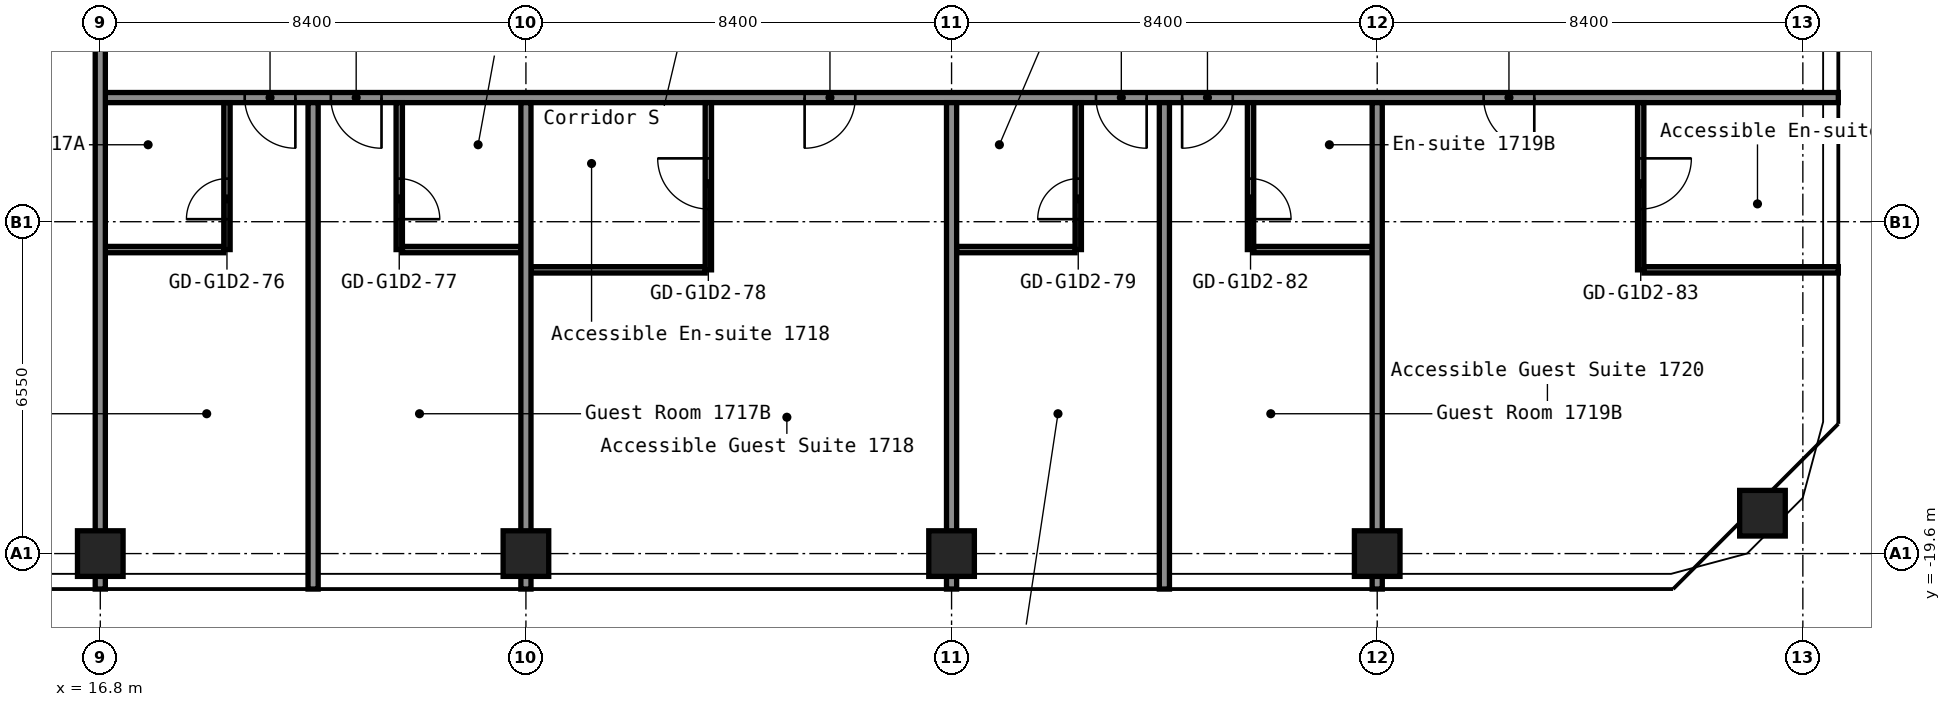
"""IFC4 building model, lengths in metres.
Left out: names, types, materials, properties, quantities, classifications, styles, units other than length and angle.
Written with IfcOpenShell. Run it as: python <this file> out.ifc"""

import sys

from ifc_helpers import new_model, si_unit, direction, frame, frame_2d, origin, origin_2d, place, context, subcontext, project, spatial, rectangle, hollow_rectangle, extrude, element, fill, save


model = new_model("IFC4")
c1 = context("Model", 3, precision=1e-05, world=origin(), true_north=direction((0.0, 1.0)))
c2 = subcontext(c1, "Body", "Model", "MODEL_VIEW")
j1 = project(units=[si_unit("LENGTHUNIT", "METRE"), si_unit("PLANEANGLEUNIT", "RADIAN")], contexts=[c1])
p1 = place(None, origin())
s1 = spatial("IfcSite", under=j1, at=p1, CompositionType="ELEMENT")
p2 = place(p1, origin())
s2 = spatial("IfcBuilding", under=s1, at=p2, CompositionType="ELEMENT")
p3 = place(p2, frame((0.0, 0.0, 61.4)))
s3 = spatial("IfcBuildingStorey", under=s2, at=p3, CompositionType="ELEMENT", Elevation=61.4)
for number, where, z_axis, x_axis in (
    (1, (16.8, -19.6, 0.0), (0.0, 0.0, 1.0), (1.0, 0.0, 0.0)),
    (2, (25.2, -19.6, 0.0), (0.0, 0.0, 1.0), (1.0, 0.0, 0.0)),
    (3, (33.6, -19.6, 0.0), (0.0, 0.0, 1.0), (1.0, 0.0, 0.0)),
    (4, (42.0, -19.6, 0.0), (0.0, 0.0, 1.0), (1.0, 0.0, 0.0)),
    (5, (49.603, -18.803, 0.0), (0.0, 0.0, 1.0), (1.0, 0.0, 0.0)),
):
    element("IfcColumn", number, at=place(p3, frame(where, z_axis=z_axis, x_axis=x_axis)), inside=s3, PredefinedType="COLUMN", context=c2, shape_type="SweptSolid", body=[
        extrude(hollow_rectangle(XDim=0.9, YDim=0.9, WallThickness=0.036, at=origin_2d()), origin(), (0.0, 0.0, 1.0), 2.9),
    ])
p4 = place(p3, frame((25.3, -14.0, 0.0), z_axis=(0.0, 0.0, 1.0), x_axis=(1.0, 0.0, 0.0)))
e6 = element("IfcWall", 6, at=p4, inside=s3, PredefinedType="PARTITIONING", context=c2, shape_type="SweptSolid", body=[
    extrude(rectangle(XDim=3.438, YDim=0.125, at=frame_2d((1.719, 0.0))), origin(), (0.0, 0.0, 1.0), 2.9),
])
p5 = place(p3, frame((47.262, -14.0, 0.0), z_axis=(0.0, 0.0, 1.0), x_axis=(1.0, 0.0, 0.0)))
e7 = element("IfcWall", 7, at=p5, inside=s3, PredefinedType="PARTITIONING", context=c2, shape_type="SweptSolid", body=[
    extrude(rectangle(XDim=3.838, YDim=0.125, at=frame_2d((1.919, 0.0))), origin(), (0.0, 0.0, 1.0), 2.9),
])
for number, where, z_axis, x_axis in (
    (8, (16.9, -13.6, 0.0), (0.0, 0.0, 1.0), (1.0, 0.0, 0.0)),
    (9, (22.762, -13.6, 0.0), (0.0, 0.0, 1.0), (1.0, 0.0, 0.0)),
    (10, (33.7, -13.6, 0.0), (0.0, 0.0, 1.0), (1.0, 0.0, 0.0)),
):
    element("IfcWall", number, at=place(p3, frame(where, z_axis=z_axis, x_axis=x_axis)), inside=s3, PredefinedType="PARTITIONING", context=c2, shape_type="SweptSolid", body=[
        extrude(rectangle(XDim=2.338, YDim=0.125, at=frame_2d((1.169, 0.0))), origin(), (0.0, 0.0, 1.0), 2.9),
    ])
p6 = place(p3, frame((39.562, -13.6, 0.0), z_axis=(0.0, 0.0, 1.0), x_axis=(1.0, 0.0, 0.0)))
e11 = element("IfcWall", 11, at=p6, inside=s3, PredefinedType="PARTITIONING", context=c2, shape_type="SweptSolid", body=[
    extrude(rectangle(XDim=2.337, YDim=0.125, at=frame_2d((1.169, 0.0))), origin(), (0.0, 0.0, 1.0), 2.9),
])
p7 = place(p3, frame((16.8, -10.6, 0.0), z_axis=(0.0, 0.0, 1.0), x_axis=(1.0, 0.0, 0.0)))
e12 = element("IfcWall", 12, at=p7, inside=s3, PredefinedType="PARTITIONING", context=c2, shape_type="SweptSolid", body=[
    extrude(rectangle(XDim=34.3, YDim=0.2, at=frame_2d((17.15, 0.0))), origin(), (0.0, 0.0, 1.0), 2.9),
])
p8 = place(p7, frame((2.85, 0.0, 0.0)))
e13 = element("IfcOpeningElement", 13, at=p8, cuts=e12, PredefinedType="OPENING", context=c2, shape_type="SweptSolid", body=[
    extrude(rectangle(XDim=1.0, YDim=2.1, at=frame_2d((0.5, 1.05))), frame((0.0, 0.11, 0.0), z_axis=(0.0, -1.0, 0.0), x_axis=(1.0, 0.0, 0.0)), (0.0, 0.0, 1.0), 0.22),
])
p9 = place(p7, frame((4.55, 0.0, 0.0)))
e14 = element("IfcOpeningElement", 14, at=p9, cuts=e12, PredefinedType="OPENING", context=c2, shape_type="SweptSolid", body=[
    extrude(rectangle(XDim=1.0, YDim=2.1, at=frame_2d((0.5, 1.05))), frame((0.0, 0.11, 0.0), z_axis=(0.0, -1.0, 0.0), x_axis=(1.0, 0.0, 0.0)), (0.0, 0.0, 1.0), 0.22),
])
p10 = place(p7, frame((13.9, 0.0, 0.0)))
e15 = element("IfcOpeningElement", 15, at=p10, cuts=e12, PredefinedType="OPENING", context=c2, shape_type="SweptSolid", body=[
    extrude(rectangle(XDim=1.0, YDim=2.1, at=frame_2d((0.5, 1.05))), frame((0.0, 0.11, 0.0), z_axis=(0.0, -1.0, 0.0), x_axis=(1.0, 0.0, 0.0)), (0.0, 0.0, 1.0), 0.22),
])
p11 = place(p7, frame((19.65, 0.0, 0.0)))
e16 = element("IfcOpeningElement", 16, at=p11, cuts=e12, PredefinedType="OPENING", context=c2, shape_type="SweptSolid", body=[
    extrude(rectangle(XDim=1.0, YDim=2.1, at=frame_2d((0.5, 1.05))), frame((0.0, 0.11, 0.0), z_axis=(0.0, -1.0, 0.0), x_axis=(1.0, 0.0, 0.0)), (0.0, 0.0, 1.0), 0.22),
])
p12 = place(p7, frame((21.35, 0.0, 0.0)))
e17 = element("IfcOpeningElement", 17, at=p12, cuts=e12, PredefinedType="OPENING", context=c2, shape_type="SweptSolid", body=[
    extrude(rectangle(XDim=1.0, YDim=2.1, at=frame_2d((0.5, 1.05))), frame((0.0, 0.11, 0.0), z_axis=(0.0, -1.0, 0.0), x_axis=(1.0, 0.0, 0.0)), (0.0, 0.0, 1.0), 0.22),
])
p13 = place(p7, frame((27.3, 0.0, 0.0)))
e18 = element("IfcOpeningElement", 18, at=p13, cuts=e12, PredefinedType="OPENING", context=c2, shape_type="SweptSolid", body=[
    extrude(rectangle(XDim=1.0, YDim=2.1, at=frame_2d((0.5, 1.05))), frame((0.0, 0.11, 0.0), z_axis=(0.0, -1.0, 0.0), x_axis=(1.0, 0.0, 0.0)), (0.0, 0.0, 1.0), 0.22),
])
p14 = place(p3, frame((16.8, -20.3, 0.0), z_axis=(0.0, 0.0, 1.0), x_axis=(0.0, 1.0, 0.0)))
e19 = element("IfcWall", 19, at=p14, inside=s3, PredefinedType="PARTITIONING", context=c2, shape_type="SweptSolid", body=[
    extrude(rectangle(XDim=11.91, YDim=0.2, at=frame_2d((5.955, 0.0))), origin(), (0.0, 0.0, 1.0), 2.9),
])
p15 = place(p3, frame((19.3, -13.6, 0.0), z_axis=(0.0, 0.0, 1.0), x_axis=(0.0, 1.0, 0.0)))
e20 = element("IfcWall", 20, at=p15, inside=s3, PredefinedType="PARTITIONING", context=c2, shape_type="SweptSolid", body=[
    extrude(rectangle(XDim=2.9, YDim=0.125, at=frame_2d((1.45, 0.0))), origin(), (0.0, 0.0, 1.0), 2.9),
])
p16 = place(p15, frame((0.6, 0.0, 0.0)))
e21 = element("IfcOpeningElement", 21, at=p16, cuts=e20, PredefinedType="OPENING", context=c2, shape_type="SweptSolid", body=[
    extrude(rectangle(XDim=0.8, YDim=2.1, at=frame_2d((0.4, 1.05))), frame((0.0, 0.073, 0.0), z_axis=(0.0, -1.0, 0.0), x_axis=(1.0, 0.0, 0.0)), (0.0, 0.0, 1.0), 0.145),
])
p17 = place(p3, frame((21.0, -20.3, 0.0), z_axis=(0.0, 0.0, 1.0), x_axis=(0.0, 1.0, 0.0)))
e22 = element("IfcWall", 22, at=p17, inside=s3, PredefinedType="PARTITIONING", context=c2, shape_type="SweptSolid", body=[
    extrude(rectangle(XDim=9.6, YDim=0.2, at=frame_2d((4.8, 0.0))), origin(), (0.0, 0.0, 1.0), 2.9),
])
p18 = place(p3, frame((22.7, -13.6, 0.0), z_axis=(0.0, 0.0, 1.0), x_axis=(0.0, 1.0, 0.0)))
e23 = element("IfcWall", 23, at=p18, inside=s3, PredefinedType="PARTITIONING", context=c2, shape_type="SweptSolid", body=[
    extrude(rectangle(XDim=2.9, YDim=0.125, at=frame_2d((1.45, 0.0))), origin(), (0.0, 0.0, 1.0), 2.9),
])
p19 = place(p18, frame((0.6, 0.0, 0.0)))
e24 = element("IfcOpeningElement", 24, at=p19, cuts=e23, PredefinedType="OPENING", context=c2, shape_type="SweptSolid", body=[
    extrude(rectangle(XDim=0.8, YDim=2.1, at=frame_2d((0.4, 1.05))), frame((0.0, 0.073, 0.0), z_axis=(0.0, -1.0, 0.0), x_axis=(1.0, 0.0, 0.0)), (0.0, 0.0, 1.0), 0.145),
])
p20 = place(p3, frame((25.2, -20.3, 0.0), z_axis=(0.0, 0.0, 1.0), x_axis=(0.0, 1.0, 0.0)))
e25 = element("IfcWall", 25, at=p20, inside=s3, PredefinedType="PARTITIONING", context=c2, shape_type="SweptSolid", body=[
    extrude(rectangle(XDim=9.6, YDim=0.2, at=frame_2d((4.8, 0.0))), origin(), (0.0, 0.0, 1.0), 2.9),
])
p21 = place(p3, frame((28.8, -14.0, 0.0), z_axis=(0.0, 0.0, 1.0), x_axis=(0.0, 1.0, 0.0)))
e26 = element("IfcWall", 26, at=p21, inside=s3, PredefinedType="PARTITIONING", context=c2, shape_type="SweptSolid", body=[
    extrude(rectangle(XDim=3.3, YDim=0.125, at=frame_2d((1.65, 0.0))), origin(), (0.0, 0.0, 1.0), 2.9),
])
p22 = place(p21, frame((1.2, 0.0, 0.0)))
e27 = element("IfcOpeningElement", 27, at=p22, cuts=e26, PredefinedType="OPENING", context=c2, shape_type="SweptSolid", body=[
    extrude(rectangle(XDim=1.0, YDim=2.1, at=frame_2d((0.5, 1.05))), frame((0.0, 0.073, 0.0), z_axis=(0.0, -1.0, 0.0), x_axis=(1.0, 0.0, 0.0)), (0.0, 0.0, 1.0), 0.145),
])
p23 = place(p3, frame((33.6, -20.3, 0.0), z_axis=(0.0, 0.0, 1.0), x_axis=(0.0, 1.0, 0.0)))
e28 = element("IfcWall", 28, at=p23, inside=s3, PredefinedType="PARTITIONING", context=c2, shape_type="SweptSolid", body=[
    extrude(rectangle(XDim=9.6, YDim=0.2, at=frame_2d((4.8, 0.0))), origin(), (0.0, 0.0, 1.0), 2.9),
])
p24 = place(p3, frame((36.1, -13.6, 0.0), z_axis=(0.0, 0.0, 1.0), x_axis=(0.0, 1.0, 0.0)))
e29 = element("IfcWall", 29, at=p24, inside=s3, PredefinedType="PARTITIONING", context=c2, shape_type="SweptSolid", body=[
    extrude(rectangle(XDim=2.9, YDim=0.125, at=frame_2d((1.45, 0.0))), origin(), (0.0, 0.0, 1.0), 2.9),
])
p25 = place(p24, frame((0.6, 0.0, 0.0)))
e30 = element("IfcOpeningElement", 30, at=p25, cuts=e29, PredefinedType="OPENING", context=c2, shape_type="SweptSolid", body=[
    extrude(rectangle(XDim=0.8, YDim=2.1, at=frame_2d((0.4, 1.05))), frame((0.0, 0.073, 0.0), z_axis=(0.0, -1.0, 0.0), x_axis=(1.0, 0.0, 0.0)), (0.0, 0.0, 1.0), 0.145),
])
p26 = place(p3, frame((37.8, -20.3, 0.0), z_axis=(0.0, 0.0, 1.0), x_axis=(0.0, 1.0, 0.0)))
e31 = element("IfcWall", 31, at=p26, inside=s3, PredefinedType="PARTITIONING", context=c2, shape_type="SweptSolid", body=[
    extrude(rectangle(XDim=9.6, YDim=0.2, at=frame_2d((4.8, 0.0))), origin(), (0.0, 0.0, 1.0), 2.9),
])
p27 = place(p3, frame((39.5, -13.6, 0.0), z_axis=(0.0, 0.0, 1.0), x_axis=(0.0, 1.0, 0.0)))
e32 = element("IfcWall", 32, at=p27, inside=s3, PredefinedType="PARTITIONING", context=c2, shape_type="SweptSolid", body=[
    extrude(rectangle(XDim=2.9, YDim=0.125, at=frame_2d((1.45, 0.0))), origin(), (0.0, 0.0, 1.0), 2.9),
])
p28 = place(p27, frame((0.6, 0.0, 0.0)))
e33 = element("IfcOpeningElement", 33, at=p28, cuts=e32, PredefinedType="OPENING", context=c2, shape_type="SweptSolid", body=[
    extrude(rectangle(XDim=0.8, YDim=2.1, at=frame_2d((0.4, 1.05))), frame((0.0, 0.073, 0.0), z_axis=(0.0, -1.0, 0.0), x_axis=(1.0, 0.0, 0.0)), (0.0, 0.0, 1.0), 0.145),
])
p29 = place(p3, frame((42.0, -20.3, 0.0), z_axis=(0.0, 0.0, 1.0), x_axis=(0.0, 1.0, 0.0)))
e34 = element("IfcWall", 34, at=p29, inside=s3, PredefinedType="PARTITIONING", context=c2, shape_type="SweptSolid", body=[
    extrude(rectangle(XDim=9.6, YDim=0.2, at=frame_2d((4.8, 0.0))), origin(), (0.0, 0.0, 1.0), 2.9),
])
p30 = place(p3, frame((47.2, -14.0, 0.0), z_axis=(0.0, 0.0, 1.0), x_axis=(0.0, 1.0, 0.0)))
e35 = element("IfcWall", 35, at=p30, inside=s3, PredefinedType="PARTITIONING", context=c2, shape_type="SweptSolid", body=[
    extrude(rectangle(XDim=3.3, YDim=0.125, at=frame_2d((1.65, 0.0))), origin(), (0.0, 0.0, 1.0), 2.9),
])
p31 = place(p30, frame((1.2, 0.0, 0.0)))
e36 = element("IfcOpeningElement", 36, at=p31, cuts=e35, PredefinedType="OPENING", context=c2, shape_type="SweptSolid", body=[
    extrude(rectangle(XDim=1.0, YDim=2.1, at=frame_2d((0.5, 1.05))), frame((0.0, 0.073, 0.0), z_axis=(0.0, -1.0, 0.0), x_axis=(1.0, 0.0, 0.0)), (0.0, 0.0, 1.0), 0.145),
])
p32 = place(p8, origin())
e37 = element("IfcDoor", 37, at=p32, inside=s3, OperationType="SINGLE_SWING_RIGHT", PredefinedType="DOOR", context=c2, shape_type="SweptSolid", body=[
    extrude(rectangle(XDim=1.0, YDim=2.1, at=frame_2d((0.5, 1.05))), frame((0.0, 0.025, 0.0), z_axis=(0.0, -1.0, 0.0), x_axis=(1.0, 0.0, 0.0)), (0.0, 0.0, 1.0), 0.05),
])
fill(e13, e37)
p33 = place(p9, origin())
e38 = element("IfcDoor", 38, at=p33, inside=s3, OperationType="SINGLE_SWING_RIGHT", PredefinedType="DOOR", context=c2, shape_type="SweptSolid", body=[
    extrude(rectangle(XDim=1.0, YDim=2.1, at=frame_2d((0.5, 1.05))), frame((0.0, 0.025, 0.0), z_axis=(0.0, -1.0, 0.0), x_axis=(1.0, 0.0, 0.0)), (0.0, 0.0, 1.0), 0.05),
])
fill(e14, e38)
p34 = place(p10, origin())
e39 = element("IfcDoor", 39, at=p34, inside=s3, OperationType="SINGLE_SWING_LEFT", PredefinedType="DOOR", context=c2, shape_type="SweptSolid", body=[
    extrude(rectangle(XDim=1.0, YDim=2.1, at=frame_2d((0.5, 1.05))), frame((0.0, 0.025, 0.0), z_axis=(0.0, -1.0, 0.0), x_axis=(1.0, 0.0, 0.0)), (0.0, 0.0, 1.0), 0.05),
])
fill(e15, e39)
p35 = place(p11, origin())
e40 = element("IfcDoor", 40, at=p35, inside=s3, OperationType="SINGLE_SWING_RIGHT", PredefinedType="DOOR", context=c2, shape_type="SweptSolid", body=[
    extrude(rectangle(XDim=1.0, YDim=2.1, at=frame_2d((0.5, 1.05))), frame((0.0, 0.025, 0.0), z_axis=(0.0, -1.0, 0.0), x_axis=(1.0, 0.0, 0.0)), (0.0, 0.0, 1.0), 0.05),
])
fill(e16, e40)
p36 = place(p12, origin())
e41 = element("IfcDoor", 41, at=p36, inside=s3, OperationType="SINGLE_SWING_LEFT", PredefinedType="DOOR", context=c2, shape_type="SweptSolid", body=[
    extrude(rectangle(XDim=1.0, YDim=2.1, at=frame_2d((0.5, 1.05))), frame((0.0, 0.025, 0.0), z_axis=(0.0, -1.0, 0.0), x_axis=(1.0, 0.0, 0.0)), (0.0, 0.0, 1.0), 0.05),
])
fill(e17, e41)
p37 = place(p13, origin())
e42 = element("IfcDoor", 42, at=p37, inside=s3, OperationType="SINGLE_SWING_RIGHT", PredefinedType="DOOR", context=c2, shape_type="SweptSolid", body=[
    extrude(rectangle(XDim=1.0, YDim=2.1, at=frame_2d((0.5, 1.05))), frame((0.0, 0.025, 0.0), z_axis=(0.0, -1.0, 0.0), x_axis=(1.0, 0.0, 0.0)), (0.0, 0.0, 1.0), 0.05),
])
fill(e18, e42)
p38 = place(p16, origin())
e43 = element("IfcDoor", 43, at=p38, inside=s3, OperationType="SINGLE_SWING_RIGHT", PredefinedType="DOOR", context=c2, shape_type="SweptSolid", body=[
    extrude(rectangle(XDim=0.8, YDim=2.1, at=frame_2d((0.4, 1.05))), frame((0.0, 0.025, 0.0), z_axis=(0.0, -1.0, 0.0), x_axis=(1.0, 0.0, 0.0)), (0.0, 0.0, 1.0), 0.05),
])
fill(e21, e43)
p39 = place(p19, origin())
e44 = element("IfcDoor", 44, at=p39, inside=s3, OperationType="SINGLE_SWING_LEFT", PredefinedType="DOOR", context=c2, shape_type="SweptSolid", body=[
    extrude(rectangle(XDim=0.8, YDim=2.1, at=frame_2d((0.4, 1.05))), frame((0.0, 0.025, 0.0), z_axis=(0.0, -1.0, 0.0), x_axis=(1.0, 0.0, 0.0)), (0.0, 0.0, 1.0), 0.05),
])
fill(e24, e44)
p40 = place(p22, origin())
e45 = element("IfcDoor", 45, at=p40, inside=s3, OperationType="SINGLE_SWING_LEFT", PredefinedType="DOOR", context=c2, shape_type="SweptSolid", body=[
    extrude(rectangle(XDim=1.0, YDim=2.1, at=frame_2d((0.5, 1.05))), frame((0.0, 0.025, 0.0), z_axis=(0.0, -1.0, 0.0), x_axis=(1.0, 0.0, 0.0)), (0.0, 0.0, 1.0), 0.05),
])
fill(e27, e45)
p41 = place(p25, origin())
e46 = element("IfcDoor", 46, at=p41, inside=s3, OperationType="SINGLE_SWING_RIGHT", PredefinedType="DOOR", context=c2, shape_type="SweptSolid", body=[
    extrude(rectangle(XDim=0.8, YDim=2.1, at=frame_2d((0.4, 1.05))), frame((0.0, 0.025, 0.0), z_axis=(0.0, -1.0, 0.0), x_axis=(1.0, 0.0, 0.0)), (0.0, 0.0, 1.0), 0.05),
])
fill(e30, e46)
p42 = place(p28, origin())
e47 = element("IfcDoor", 47, at=p42, inside=s3, OperationType="SINGLE_SWING_LEFT", PredefinedType="DOOR", context=c2, shape_type="SweptSolid", body=[
    extrude(rectangle(XDim=0.8, YDim=2.1, at=frame_2d((0.4, 1.05))), frame((0.0, 0.025, 0.0), z_axis=(0.0, -1.0, 0.0), x_axis=(1.0, 0.0, 0.0)), (0.0, 0.0, 1.0), 0.05),
])
fill(e33, e47)
p43 = place(p31, origin())
e48 = element("IfcDoor", 48, at=p43, inside=s3, OperationType="SINGLE_SWING_RIGHT", PredefinedType="DOOR", context=c2, shape_type="SweptSolid", body=[
    extrude(rectangle(XDim=1.0, YDim=2.1, at=frame_2d((0.5, 1.05))), frame((0.0, 0.025, 0.0), z_axis=(0.0, -1.0, 0.0), x_axis=(1.0, 0.0, 0.0)), (0.0, 0.0, 1.0), 0.05),
])
fill(e36, e48)
save(model, sys.argv[1])
